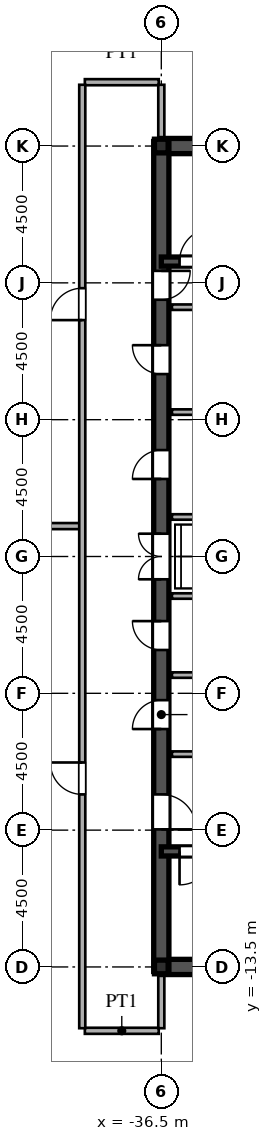
"""IFC4 building model, lengths in metres.
Left out: names, types, materials, properties, quantities, classifications, styles, units other than length and angle.
Written with IfcOpenShell. Run it as: python <this file> out.ifc"""

import sys

from ifc_helpers import new_model, si_unit, direction, frame, frame_2d, origin, origin_2d, place, context, subcontext, project, spatial, rectangle, i_section, extrude, source, transform, mapped, element, fill, save


model = new_model("IFC4")
c1 = context("Model", 3, precision=1e-05, world=origin(), true_north=direction((0.0, 1.0)))
c2 = subcontext(c1, "Body", "Model", "MODEL_VIEW")
j1 = project(units=[si_unit("LENGTHUNIT", "METRE"), si_unit("PLANEANGLEUNIT", "RADIAN")], contexts=[c1])
p1 = place(None, origin())
s1 = spatial("IfcSite", under=j1, at=p1, CompositionType="ELEMENT")
p2 = place(p1, origin())
s2 = spatial("IfcBuilding", under=s1, at=p2, CompositionType="ELEMENT")
p3 = place(p2, frame((0.0, 0.0, 258.15)))
s3 = spatial("IfcBuildingStorey", under=s2, at=p3, CompositionType="ELEMENT", Elevation=258.15)
m1 = source(origin(), c2, "Body", "SweptSolid", [
    extrude(i_section(OverallWidth=0.45, OverallDepth=0.45, WebThickness=0.016, FlangeThickness=0.025, at=origin_2d()), origin(), (0.0, 0.0, 1.0), 3.75),
])
for number, where, z_axis, x_axis in (
    (1, (-36.5, -13.5, 0.0), (0.0, 0.0, 1.0), (1.0, 0.0, 0.0)),
    (2, (-36.5, 13.5, 0.0), (0.0, 0.0, 1.0), (1.0, 0.0, 0.0)),
):
    element("IfcColumn", number, at=place(p3, frame(where, z_axis=z_axis, x_axis=x_axis)), inside=s3, PredefinedType="COLUMN", context=c2, shape_type="MappedRepresentation", body=[
        mapped(m1, transform((0.0, 0.0, 0.0), scale=1.0)),
    ])
for number, where, z_axis, x_axis in (
    (3, (-36.5, -13.5, 0.0), (0.0, 0.0, 1.0), (1.0, 0.0, 0.0)),
    (4, (-36.5, 13.5, 0.0), (0.0, 0.0, 1.0), (1.0, 0.0, 0.0)),
):
    element("IfcWall", number, at=place(p3, frame(where, z_axis=z_axis, x_axis=x_axis)), inside=s3, PredefinedType="SHEAR", context=c2, shape_type="SweptSolid", body=[
        extrude(rectangle(XDim=9.0, YDim=0.5, at=frame_2d((4.5, 0.0))), origin(), (0.0, 0.0, 1.0), 3.53),
    ])
p4 = place(p3, frame((-36.5, -13.65, 0.0), z_axis=(0.0, 0.0, 1.0), x_axis=(0.0, 1.0, 0.0)))
e5 = element("IfcWall", 5, at=p4, inside=s3, PredefinedType="SHEAR", context=c2, shape_type="SweptSolid", body=[
    extrude(rectangle(XDim=7.15, YDim=0.5, at=frame_2d((3.575, 0.0))), origin(), (0.0, 0.0, 1.0), 3.53),
])
p5 = place(p4, frame((4.675, 0.0, 0.0)))
e6 = element("IfcOpeningElement", 6, at=p5, cuts=e5, PredefinedType="OPENING", context=c2, shape_type="SweptSolid", body=[
    extrude(rectangle(XDim=1.15, YDim=2.2, at=frame_2d((0.575, 1.1))), frame((0.0, 0.26, 0.0), z_axis=(0.0, -1.0, 0.0), x_axis=(1.0, 0.0, 0.0)), (0.0, 0.0, 1.0), 0.52),
])
p6 = place(p3, frame((-36.5, -1.3, 0.0), z_axis=(0.0, 0.0, 1.0), x_axis=(0.0, 1.0, 0.0)))
e7 = element("IfcWall", 7, at=p6, inside=s3, PredefinedType="SHEAR", context=c2, shape_type="SweptSolid", body=[
    extrude(rectangle(XDim=2.6, YDim=0.5, at=frame_2d((1.3, 0.0))), origin(), (0.0, 0.0, 1.0), 3.53),
])
p7 = place(p6, frame((0.55, 0.0, 0.0)))
e8 = element("IfcOpeningElement", 8, at=p7, cuts=e7, PredefinedType="OPENING", context=c2, shape_type="SweptSolid", body=[
    extrude(rectangle(XDim=1.5, YDim=2.3, at=frame_2d((0.75, 1.15))), frame((0.0, 0.26, 0.0), z_axis=(0.0, -1.0, 0.0), x_axis=(1.0, 0.0, 0.0)), (0.0, 0.0, 1.0), 0.52),
])
p8 = place(p3, frame((-36.5, 8.2, 0.0), z_axis=(0.0, 0.0, 1.0), x_axis=(0.0, 1.0, 0.0)))
e9 = element("IfcWall", 9, at=p8, inside=s3, PredefinedType="SHEAR", context=c2, shape_type="SweptSolid", body=[
    extrude(rectangle(XDim=5.45, YDim=0.5, at=frame_2d((2.725, 0.0))), origin(), (0.0, 0.0, 1.0), 3.53),
])
p9 = place(p8, frame((0.245, 0.0, 0.0)))
e10 = element("IfcOpeningElement", 10, at=p9, cuts=e9, PredefinedType="OPENING", context=c2, shape_type="SweptSolid", body=[
    extrude(rectangle(XDim=0.95, YDim=2.15, at=frame_2d((0.475, 1.075))), frame((0.0, 0.26, 0.0), z_axis=(0.0, -1.0, 0.0), x_axis=(1.0, 0.0, 0.0)), (0.0, 0.0, 1.0), 0.52),
])
p10 = place(p3, frame((-36.5, -6.5, 0.0), z_axis=(0.0, 0.0, 1.0), x_axis=(0.0, 1.0, 0.0)))
e11 = element("IfcWall", 11, at=p10, inside=s3, PredefinedType="SHEAR", context=c2, shape_type="SweptSolid", body=[
    extrude(rectangle(XDim=2.6, YDim=0.5, at=frame_2d((1.3, 0.0))), origin(), (0.0, 0.0, 1.0), 3.53),
])
p11 = place(p10, frame((0.825, 0.0, 0.0)))
e12 = element("IfcOpeningElement", 12, at=p11, cuts=e11, PredefinedType="OPENING", context=c2, shape_type="SweptSolid", body=[
    extrude(rectangle(XDim=0.95, YDim=2.15, at=frame_2d((0.475, 1.075))), frame((0.0, 0.26, 0.0), z_axis=(0.0, -1.0, 0.0), x_axis=(1.0, 0.0, 0.0)), (0.0, 0.0, 1.0), 0.52),
])
p12 = place(p3, frame((-36.5, -3.9, 0.0), z_axis=(0.0, 0.0, 1.0), x_axis=(0.0, 1.0, 0.0)))
e13 = element("IfcWall", 13, at=p12, inside=s3, PredefinedType="SHEAR", context=c2, shape_type="SweptSolid", body=[
    extrude(rectangle(XDim=2.6, YDim=0.5, at=frame_2d((1.3, 0.0))), origin(), (0.0, 0.0, 1.0), 3.53),
])
p13 = place(p12, frame((0.825, 0.0, 0.0)))
e14 = element("IfcOpeningElement", 14, at=p13, cuts=e13, PredefinedType="OPENING", context=c2, shape_type="SweptSolid", body=[
    extrude(rectangle(XDim=0.95, YDim=2.15, at=frame_2d((0.475, 1.075))), frame((0.0, 0.26, 0.0), z_axis=(0.0, -1.0, 0.0), x_axis=(1.0, 0.0, 0.0)), (0.0, 0.0, 1.0), 0.52),
])
p14 = place(p3, frame((-36.5, 1.3, 0.0), z_axis=(0.0, 0.0, 1.0), x_axis=(0.0, 1.0, 0.0)))
e15 = element("IfcWall", 15, at=p14, inside=s3, PredefinedType="SHEAR", context=c2, shape_type="SweptSolid", body=[
    extrude(rectangle(XDim=3.45, YDim=0.5, at=frame_2d((1.725, 0.0))), origin(), (0.0, 0.0, 1.0), 3.53),
])
p15 = place(p14, frame((1.25, 0.0, 0.0)))
e16 = element("IfcOpeningElement", 16, at=p15, cuts=e15, PredefinedType="OPENING", context=c2, shape_type="SweptSolid", body=[
    extrude(rectangle(XDim=0.95, YDim=2.15, at=frame_2d((0.475, 1.075))), frame((0.0, 0.26, 0.0), z_axis=(0.0, -1.0, 0.0), x_axis=(1.0, 0.0, 0.0)), (0.0, 0.0, 1.0), 0.52),
])
p16 = place(p3, frame((-36.5, 4.75, 0.0), z_axis=(0.0, 0.0, 1.0), x_axis=(0.0, 1.0, 0.0)))
e17 = element("IfcWall", 17, at=p16, inside=s3, PredefinedType="SHEAR", context=c2, shape_type="SweptSolid", body=[
    extrude(rectangle(XDim=3.45, YDim=0.5, at=frame_2d((1.725, 0.0))), origin(), (0.0, 0.0, 1.0), 3.53),
])
p17 = place(p16, frame((1.25, 0.0, 0.0)))
e18 = element("IfcOpeningElement", 18, at=p17, cuts=e17, PredefinedType="OPENING", context=c2, shape_type="SweptSolid", body=[
    extrude(rectangle(XDim=0.95, YDim=2.15, at=frame_2d((0.475, 1.075))), frame((0.0, 0.26, 0.0), z_axis=(0.0, -1.0, 0.0), x_axis=(1.0, 0.0, 0.0)), (0.0, 0.0, 1.0), 0.52),
])
p18 = place(p3, frame((-36.5, -9.7, 0.0), z_axis=(0.0, 0.0, 1.0), x_axis=(1.0, 0.0, 0.0)))
e19 = element("IfcWall", 19, at=p18, inside=s3, PredefinedType="SHEAR", context=c2, shape_type="SweptSolid", body=[
    extrude(rectangle(XDim=9.0, YDim=0.3, at=frame_2d((4.5, 0.0))), origin(), (0.0, 0.0, 1.0), 3.53),
])
p19 = place(p18, frame((0.6, 0.0, 0.0)))
e20 = element("IfcOpeningElement", 20, at=p19, cuts=e19, PredefinedType="OPENING", context=c2, shape_type="SweptSolid", body=[
    extrude(rectangle(XDim=1.1, YDim=2.2, at=frame_2d((0.55, 1.1))), frame((0.0, 0.16, 0.0), z_axis=(0.0, -1.0, 0.0), x_axis=(1.0, 0.0, 0.0)), (0.0, 0.0, 1.0), 0.32),
])
p20 = place(p3, frame((-36.5, 9.7, 0.0), z_axis=(0.0, 0.0, 1.0), x_axis=(1.0, 0.0, 0.0)))
e21 = element("IfcWall", 21, at=p20, inside=s3, PredefinedType="SHEAR", context=c2, shape_type="SweptSolid", body=[
    extrude(rectangle(XDim=9.0, YDim=0.3, at=frame_2d((4.5, 0.0))), origin(), (0.0, 0.0, 1.0), 3.53),
])
p21 = place(p20, frame((0.6, 0.0, 0.0)))
e22 = element("IfcOpeningElement", 22, at=p21, cuts=e21, PredefinedType="OPENING", context=c2, shape_type="SweptSolid", body=[
    extrude(rectangle(XDim=1.1, YDim=2.2, at=frame_2d((0.55, 1.1))), frame((0.0, 0.16, 0.0), z_axis=(0.0, -1.0, 0.0), x_axis=(1.0, 0.0, 0.0)), (0.0, 0.0, 1.0), 0.32),
])
for number, where, z_axis, x_axis in (
    (23, (-36.15, -6.5, 0.0), (0.0, 0.0, 1.0), (1.0, 0.0, 0.0)),
    (24, (-36.15, 8.2, 0.0), (0.0, 0.0, 1.0), (1.0, 0.0, 0.0)),
):
    element("IfcWall", number, at=place(p3, frame(where, z_axis=z_axis, x_axis=x_axis)), inside=s3, PredefinedType="PARTITIONING", context=c2, shape_type="SweptSolid", body=[
        extrude(rectangle(XDim=5.7, YDim=0.18, at=frame_2d((2.85, 0.0))), origin(), (0.0, 0.0, 1.0), 3.53),
    ])
for number, where, z_axis, x_axis in (
    (25, (-36.15, -1.3, 0.0), (0.0, 0.0, 1.0), (1.0, 0.0, 0.0)),
    (26, (-36.15, 1.3, 0.0), (0.0, 0.0, 1.0), (1.0, 0.0, 0.0)),
    (27, (-36.15, -3.9, 0.0), (0.0, 0.0, 1.0), (1.0, 0.0, 0.0)),
    (28, (-36.15, 4.75, 0.0), (0.0, 0.0, 1.0), (1.0, 0.0, 0.0)),
):
    element("IfcWall", number, at=place(p3, frame(where, z_axis=z_axis, x_axis=x_axis)), inside=s3, PredefinedType="PARTITIONING", context=c2, shape_type="SweptSolid", body=[
        extrude(rectangle(XDim=2.95, YDim=0.18, at=frame_2d((1.475, 0.0))), origin(), (0.0, 0.0, 1.0), 3.53),
    ])
p22 = place(p3, frame((-39.015, -15.6, 0.0), z_axis=(0.0, 0.0, 1.0), x_axis=(1.0, 0.0, 0.0)))
e29 = element("IfcWall", 29, at=p22, inside=s3, PredefinedType="PARTITIONING", context=c2, shape_type="SweptSolid", body=[
    extrude(rectangle(XDim=2.43, YDim=0.2, at=frame_2d((1.215, 0.0))), origin(), (0.0, 0.0, 1.0), 3.53),
])
p23 = place(p3, frame((-67.375, 1.0, 0.0), z_axis=(0.0, 0.0, 1.0), x_axis=(1.0, 0.0, 0.0)))
e30 = element("IfcWall", 30, at=p23, inside=s3, PredefinedType="PARTITIONING", context=c2, shape_type="SweptSolid", body=[
    extrude(rectangle(XDim=28.195, YDim=0.2, at=frame_2d((14.098, 0.0))), origin(), (0.0, 0.0, 1.0), 3.53),
])
p24 = place(p3, frame((-39.015, 15.6, 0.0), z_axis=(0.0, 0.0, 1.0), x_axis=(1.0, 0.0, 0.0)))
e31 = element("IfcWall", 31, at=p24, inside=s3, PredefinedType="PARTITIONING", context=c2, shape_type="SweptSolid", body=[
    extrude(rectangle(XDim=2.43, YDim=0.2, at=frame_2d((1.215, 0.0))), origin(), (0.0, 0.0, 1.0), 3.53),
])
p25 = place(p3, frame((-39.1, -15.515, 0.0), z_axis=(0.0, 0.0, 1.0), x_axis=(0.0, 1.0, 0.0)))
e32 = element("IfcWall", 32, at=p25, inside=s3, PredefinedType="PARTITIONING", context=c2, shape_type="SweptSolid", body=[
    extrude(rectangle(XDim=31.03, YDim=0.2, at=frame_2d((15.515, 0.0))), origin(), (0.0, 0.0, 1.0), 3.53),
])
p26 = place(p25, frame((7.69, 0.0, 0.0)))
e33 = element("IfcOpeningElement", 33, at=p26, cuts=e32, PredefinedType="OPENING", context=c2, shape_type="SweptSolid", body=[
    extrude(rectangle(XDim=1.05, YDim=2.25, at=frame_2d((0.525, 1.125))), frame((0.0, 0.11, 0.0), z_axis=(0.0, -1.0, 0.0), x_axis=(1.0, 0.0, 0.0)), (0.0, 0.0, 1.0), 0.22),
])
p27 = place(p25, frame((23.29, 0.0, 0.0)))
e34 = element("IfcOpeningElement", 34, at=p27, cuts=e32, PredefinedType="OPENING", context=c2, shape_type="SweptSolid", body=[
    extrude(rectangle(XDim=1.05, YDim=2.25, at=frame_2d((0.525, 1.125))), frame((0.0, 0.11, 0.0), z_axis=(0.0, -1.0, 0.0), x_axis=(1.0, 0.0, 0.0)), (0.0, 0.0, 1.0), 0.22),
])
for number, where, z_axis, x_axis in (
    (35, (-36.5, -15.515, 0.0), (0.0, 0.0, 1.0), (0.0, 1.0, 0.0)),
    (36, (-36.5, 13.755, 0.0), (0.0, 0.0, 1.0), (0.0, 1.0, 0.0)),
):
    element("IfcWall", number, at=place(p3, frame(where, z_axis=z_axis, x_axis=x_axis)), inside=s3, PredefinedType="PARTITIONING", context=c2, shape_type="SweptSolid", body=[
        extrude(rectangle(XDim=1.76, YDim=0.2, at=frame_2d((0.88, 0.0))), origin(), (0.0, 0.0, 1.0), 2.93),
    ])
m2 = source(origin(), c2, "Body", "SweptSolid", [
    extrude(rectangle(XDim=1.15, YDim=2.2, at=frame_2d((0.575, 1.1))), frame((0.0, 0.025, 0.0), z_axis=(0.0, -1.0, 0.0), x_axis=(1.0, 0.0, 0.0)), (0.0, 0.0, 1.0), 0.05),
])
p28 = place(p5, frame((1.15, 0.0, 0.0), z_axis=(0.0, 0.0, 1.0), x_axis=(-1.0, 0.0, 0.0)))
e37 = element("IfcDoor", 37, at=p28, inside=s3, OperationType="SINGLE_SWING_LEFT", PredefinedType="DOOR", context=c2, shape_type="MappedRepresentation", body=[
    mapped(m2, transform((0.0, 0.0, 0.0), scale=1.0)),
])
fill(e6, e37)
m3 = source(origin(), c2, "Body", "SweptSolid", [
    extrude(rectangle(XDim=1.5, YDim=2.3, at=frame_2d((0.75, 1.15))), frame((0.0, 0.025, 0.0), z_axis=(0.0, -1.0, 0.0), x_axis=(1.0, 0.0, 0.0)), (0.0, 0.0, 1.0), 0.05),
])
p29 = place(p7, origin())
e38 = element("IfcDoor", 38, at=p29, inside=s3, OperationType="DOUBLE_SWING_LEFT", PredefinedType="DOOR", context=c2, shape_type="MappedRepresentation", body=[
    mapped(m3, transform((0.0, 0.0, 0.0), scale=1.0)),
])
fill(e8, e38)
m4 = source(origin(), c2, "Body", "SweptSolid", [
    extrude(rectangle(XDim=0.95, YDim=2.15, at=frame_2d((0.475, 1.075))), frame((0.0, 0.025, 0.0), z_axis=(0.0, -1.0, 0.0), x_axis=(1.0, 0.0, 0.0)), (0.0, 0.0, 1.0), 0.05),
])
p30 = place(p9, frame((0.95, 0.0, 0.0), z_axis=(0.0, 0.0, 1.0), x_axis=(-1.0, 0.0, 0.0)))
e39 = element("IfcDoor", 39, at=p30, inside=s3, OperationType="SINGLE_SWING_RIGHT", PredefinedType="DOOR", context=c2, shape_type="MappedRepresentation", body=[
    mapped(m4, transform((0.0, 0.0, 0.0), scale=1.0)),
])
fill(e10, e39)
p31 = place(p11, origin())
e40 = element("IfcDoor", 40, at=p31, inside=s3, OperationType="SINGLE_SWING_LEFT", PredefinedType="DOOR", context=c2, shape_type="MappedRepresentation", body=[
    mapped(m4, transform((0.0, 0.0, 0.0), scale=1.0)),
])
fill(e12, e40)
p32 = place(p13, origin())
e41 = element("IfcDoor", 41, at=p32, inside=s3, OperationType="SINGLE_SWING_RIGHT", PredefinedType="DOOR", context=c2, shape_type="MappedRepresentation", body=[
    mapped(m4, transform((0.0, 0.0, 0.0), scale=1.0)),
])
fill(e14, e41)
p33 = place(p15, origin())
e42 = element("IfcDoor", 42, at=p33, inside=s3, OperationType="SINGLE_SWING_LEFT", PredefinedType="DOOR", context=c2, shape_type="MappedRepresentation", body=[
    mapped(m4, transform((0.0, 0.0, 0.0), scale=1.0)),
])
fill(e16, e42)
p34 = place(p17, origin())
e43 = element("IfcDoor", 43, at=p34, inside=s3, OperationType="SINGLE_SWING_RIGHT", PredefinedType="DOOR", context=c2, shape_type="MappedRepresentation", body=[
    mapped(m4, transform((0.0, 0.0, 0.0), scale=1.0)),
])
fill(e18, e43)
m5 = source(origin(), c2, "Body", "SweptSolid", [
    extrude(rectangle(XDim=1.1, YDim=2.2, at=frame_2d((0.55, 1.1))), frame((0.0, 0.025, 0.0), z_axis=(0.0, -1.0, 0.0), x_axis=(1.0, 0.0, 0.0)), (0.0, 0.0, 1.0), 0.05),
])
p35 = place(p19, frame((1.1, 0.0, 0.0), z_axis=(0.0, 0.0, 1.0), x_axis=(-1.0, 0.0, 0.0)))
e44 = element("IfcDoor", 44, at=p35, inside=s3, OperationType="SINGLE_SWING_LEFT", PredefinedType="DOOR", context=c2, shape_type="MappedRepresentation", body=[
    mapped(m5, transform((0.0, 0.0, 0.0), scale=1.0)),
])
fill(e20, e44)
p36 = place(p21, origin())
e45 = element("IfcDoor", 45, at=p36, inside=s3, OperationType="SINGLE_SWING_RIGHT", PredefinedType="DOOR", context=c2, shape_type="MappedRepresentation", body=[
    mapped(m5, transform((0.0, 0.0, 0.0), scale=1.0)),
])
fill(e22, e45)
m6 = source(origin(), c2, "Body", "SweptSolid", [
    extrude(rectangle(XDim=1.05, YDim=2.25, at=frame_2d((0.525, 1.125))), frame((0.0, 0.025, 0.0), z_axis=(0.0, -1.0, 0.0), x_axis=(1.0, 0.0, 0.0)), (0.0, 0.0, 1.0), 0.05),
])
p37 = place(p26, origin())
e46 = element("IfcDoor", 46, at=p37, inside=s3, OperationType="SINGLE_SWING_RIGHT", PredefinedType="DOOR", context=c2, shape_type="MappedRepresentation", body=[
    mapped(m6, transform((0.0, 0.0, 0.0), scale=1.0)),
])
fill(e33, e46)
p38 = place(p27, origin())
e47 = element("IfcDoor", 47, at=p38, inside=s3, OperationType="SINGLE_SWING_LEFT", PredefinedType="DOOR", context=c2, shape_type="MappedRepresentation", body=[
    mapped(m6, transform((0.0, 0.0, 0.0), scale=1.0)),
])
fill(e34, e47)
save(model, sys.argv[1])
